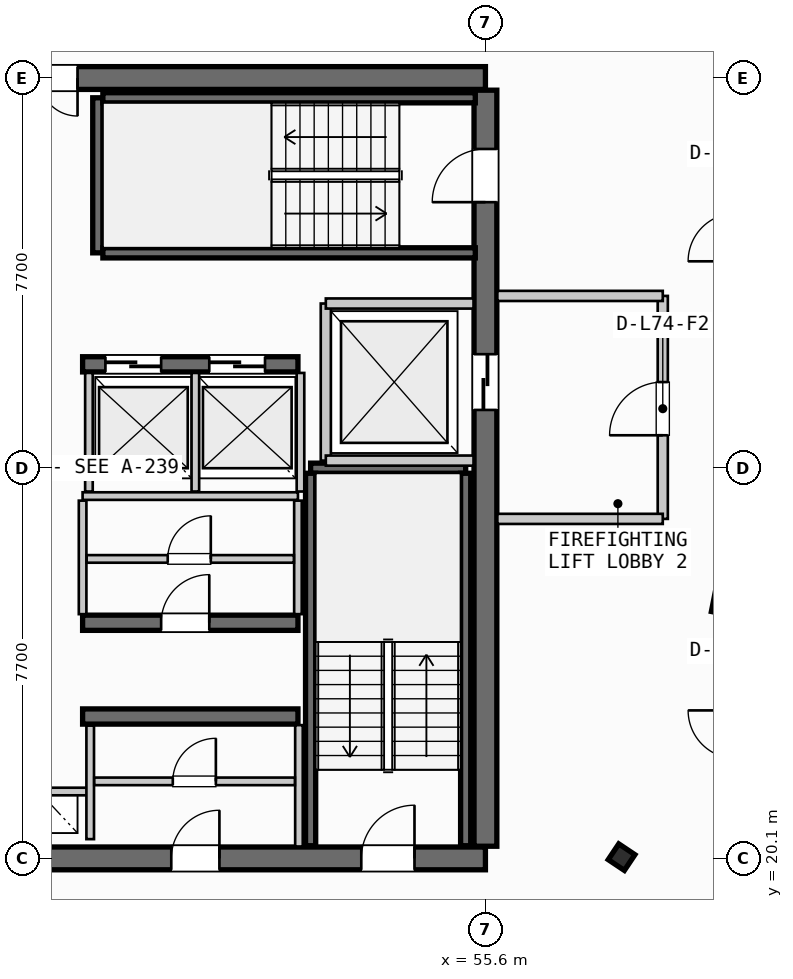
"""IFC4 building model, lengths in metres.
Left out: names, types, materials, properties, quantities, classifications, styles, units other than length and angle.
Written with IfcOpenShell. Run it as: python <this file> out.ifc"""

import sys

from ifc_helpers import new_model, si_unit, direction, frame, frame_2d, origin, origin_2d, place, context, subcontext, project, spatial, rectangle, i_section, extrude, source, transform, mapped, element, fill, save


model = new_model("IFC4")
c1 = context("Model", 3, precision=1e-05, world=origin(), true_north=direction((0.0, 1.0)))
c2 = subcontext(c1, "Body", "Model", "MODEL_VIEW")
j1 = project(units=[si_unit("LENGTHUNIT", "METRE"), si_unit("PLANEANGLEUNIT", "RADIAN")], contexts=[c1])
p1 = place(None, origin())
s1 = spatial("IfcSite", under=j1, at=p1, CompositionType="ELEMENT")
p2 = place(p1, origin())
s2 = spatial("IfcBuilding", under=s1, at=p2, CompositionType="ELEMENT")
p3 = place(p2, frame((0.0, 0.0, 280.15)))
s3 = spatial("IfcBuildingStorey", under=s2, at=p3, CompositionType="ELEMENT", Elevation=280.15)
p4 = place(p3, frame((38.0, 20.1, 0.0), z_axis=(0.0, 0.0, 1.0), x_axis=(1.0, 0.0, 0.0)))
e1 = element("IfcWall", 1, at=p4, inside=s3, PredefinedType="SHEAR", context=c2, shape_type="SweptSolid", body=[
    extrude(rectangle(XDim=17.6, YDim=0.45, at=frame_2d((8.8, 0.0))), origin(), (0.0, 0.0, 1.0), 3.21),
])
p5 = place(p4, frame((1.4, 0.0, 0.0)))
e2 = element("IfcOpeningElement", 2, at=p5, cuts=e1, PredefinedType="OPENING", context=c2, shape_type="SweptSolid", body=[
    extrude(rectangle(XDim=1.05, YDim=2.15, at=frame_2d((0.525, 1.075))), frame((0.0, 0.235, 0.0), z_axis=(0.0, -1.0, 0.0), x_axis=(1.0, 0.0, 0.0)), (0.0, 0.0, 1.0), 0.47),
])
p6 = place(p4, frame((15.15, 0.0, 0.0)))
e3 = element("IfcOpeningElement", 3, at=p6, cuts=e1, PredefinedType="OPENING", context=c2, shape_type="SweptSolid", body=[
    extrude(rectangle(XDim=1.05, YDim=2.15, at=frame_2d((0.525, 1.075))), frame((0.0, 0.235, 0.0), z_axis=(0.0, -1.0, 0.0), x_axis=(1.0, 0.0, 0.0)), (0.0, 0.0, 1.0), 0.47),
])
p7 = place(p4, frame((5.25, 0.0, 0.0)))
e4 = element("IfcOpeningElement", 4, at=p7, cuts=e1, PredefinedType="OPENING", context=c2, shape_type="SweptSolid", body=[
    extrude(rectangle(XDim=0.9, YDim=2.15, at=frame_2d((0.45, 1.075))), frame((0.0, 0.235, 0.0), z_axis=(0.0, -1.0, 0.0), x_axis=(1.0, 0.0, 0.0)), (0.0, 0.0, 1.0), 0.47),
])
p8 = place(p4, frame((11.4, 0.0, 0.0)))
e5 = element("IfcOpeningElement", 5, at=p8, cuts=e1, PredefinedType="OPENING", context=c2, shape_type="SweptSolid", body=[
    extrude(rectangle(XDim=0.95, YDim=2.15, at=frame_2d((0.475, 1.075))), frame((0.0, 0.235, 0.0), z_axis=(0.0, -1.0, 0.0), x_axis=(1.0, 0.0, 0.0)), (0.0, 0.0, 1.0), 0.47),
])
p9 = place(p3, frame((55.6, 35.5, 0.0), z_axis=(0.0, 0.0, 1.0), x_axis=(-1.0, 0.0, 0.0)))
e6 = element("IfcWall", 6, at=p9, inside=s3, PredefinedType="SHEAR", context=c2, shape_type="SweptSolid", body=[
    extrude(rectangle(XDim=17.6, YDim=0.45, at=frame_2d((8.8, 0.0))), origin(), (0.0, 0.0, 1.0), 3.21),
])
p10 = place(p9, frame((8.05, 0.0, 0.0)))
e7 = element("IfcOpeningElement", 7, at=p10, cuts=e6, PredefinedType="OPENING", context=c2, shape_type="SweptSolid", body=[
    extrude(rectangle(XDim=1.5, YDim=2.2, at=frame_2d((0.75, 1.1))), frame((0.0, 0.235, 0.0), z_axis=(0.0, -1.0, 0.0), x_axis=(1.0, 0.0, 0.0)), (0.0, 0.0, 1.0), 0.47),
])
p11 = place(p9, frame((15.1, 0.0, 0.0)))
e8 = element("IfcOpeningElement", 8, at=p11, cuts=e6, PredefinedType="OPENING", context=c2, shape_type="SweptSolid", body=[
    extrude(rectangle(XDim=0.95, YDim=2.15, at=frame_2d((0.475, 1.075))), frame((0.0, 0.235, 0.0), z_axis=(0.0, -1.0, 0.0), x_axis=(1.0, 0.0, 0.0)), (0.0, 0.0, 1.0), 0.47),
])
p12 = place(p9, frame((12.9, 0.0, 0.0)))
e9 = element("IfcOpeningElement", 9, at=p12, cuts=e6, PredefinedType="OPENING", context=c2, shape_type="SweptSolid", body=[
    extrude(rectangle(XDim=0.9, YDim=2.15, at=frame_2d((0.45, 1.075))), frame((0.0, 0.235, 0.0), z_axis=(0.0, -1.0, 0.0), x_axis=(1.0, 0.0, 0.0)), (0.0, 0.0, 1.0), 0.47),
])
p13 = place(p9, frame((10.6, 0.0, 0.0)))
e10 = element("IfcOpeningElement", 10, at=p13, cuts=e6, PredefinedType="OPENING", context=c2, shape_type="SweptSolid", body=[
    extrude(rectangle(XDim=0.95, YDim=2.15, at=frame_2d((0.475, 1.075))), frame((0.0, 0.235, 0.0), z_axis=(0.0, -1.0, 0.0), x_axis=(1.0, 0.0, 0.0)), (0.0, 0.0, 1.0), 0.47),
])
p14 = place(p3, frame((55.6, 20.34, 0.0), z_axis=(0.0, 0.0, 1.0), x_axis=(0.0, 1.0, 0.0)))
e11 = element("IfcWall", 11, at=p14, inside=s3, PredefinedType="SHEAR", context=c2, shape_type="SweptSolid", body=[
    extrude(rectangle(XDim=14.92, YDim=0.45, at=frame_2d((7.46, 0.0))), origin(), (0.0, 0.0, 1.0), 3.21),
])
p15 = place(p14, frame((12.71, 0.0, 0.0)))
e12 = element("IfcOpeningElement", 12, at=p15, cuts=e11, PredefinedType="OPENING", context=c2, shape_type="SweptSolid", body=[
    extrude(rectangle(XDim=1.05, YDim=2.15, at=frame_2d((0.525, 1.075))), frame((0.0, 0.235, 0.0), z_axis=(0.0, -1.0, 0.0), x_axis=(1.0, 0.0, 0.0)), (0.0, 0.0, 1.0), 0.47),
])
p16 = place(p14, frame((8.61, 0.0, 0.0)))
e13 = element("IfcOpeningElement", 13, at=p16, cuts=e11, PredefinedType="OPENING", context=c2, shape_type="SweptSolid", body=[
    extrude(rectangle(XDim=1.1, YDim=2.2, at=frame_2d((0.55, 1.1))), frame((0.0, 0.235, 0.0), z_axis=(0.0, -1.0, 0.0), x_axis=(1.0, 0.0, 0.0)), (0.0, 0.0, 1.0), 0.47),
])
p17 = place(p3, frame((47.65, 22.9, 0.0), z_axis=(0.0, 0.0, 1.0), x_axis=(1.0, 0.0, 0.0)))
e14 = element("IfcWall", 14, at=p17, inside=s3, PredefinedType="SHEAR", context=c2, shape_type="SweptSolid", body=[
    extrude(rectangle(XDim=4.25, YDim=0.3, at=frame_2d((2.125, 0.0))), origin(), (0.0, 0.0, 1.0), 3.21),
])
p18 = place(p3, frame((47.65, 24.75, 0.0), z_axis=(0.0, 0.0, 1.0), x_axis=(1.0, 0.0, 0.0)))
e15 = element("IfcWall", 15, at=p18, inside=s3, PredefinedType="SHEAR", context=c2, shape_type="SweptSolid", body=[
    extrude(rectangle(XDim=4.25, YDim=0.3, at=frame_2d((2.125, 0.0))), origin(), (0.0, 0.0, 1.0), 3.21),
])
p19 = place(p18, frame((1.55, 0.0, 0.0)))
e16 = element("IfcOpeningElement", 16, at=p19, cuts=e15, PredefinedType="OPENING", context=c2, shape_type="SweptSolid", body=[
    extrude(rectangle(XDim=0.95, YDim=2.15, at=frame_2d((0.475, 1.075))), frame((0.0, 0.16, 0.0), z_axis=(0.0, -1.0, 0.0), x_axis=(1.0, 0.0, 0.0)), (0.0, 0.0, 1.0), 0.32),
])
p20 = place(p3, frame((47.65, 29.85, 0.0), z_axis=(0.0, 0.0, 1.0), x_axis=(1.0, 0.0, 0.0)))
e17 = element("IfcWall", 17, at=p20, inside=s3, PredefinedType="SHEAR", context=c2, shape_type="SweptSolid", body=[
    extrude(rectangle(XDim=4.25, YDim=0.3, at=frame_2d((2.125, 0.0))), origin(), (0.0, 0.0, 1.0), 3.21),
])
p21 = place(p20, frame((0.45, 0.0, 0.0)))
e18 = element("IfcOpeningElement", 18, at=p21, cuts=e17, PredefinedType="OPENING", context=c2, shape_type="SweptSolid", body=[
    extrude(rectangle(XDim=1.1, YDim=2.2, at=frame_2d((0.55, 1.1))), frame((0.0, 0.16, 0.0), z_axis=(0.0, -1.0, 0.0), x_axis=(1.0, 0.0, 0.0)), (0.0, 0.0, 1.0), 0.32),
])
p22 = place(p20, frame((2.5, 0.0, 0.0)))
e19 = element("IfcOpeningElement", 19, at=p22, cuts=e17, PredefinedType="OPENING", context=c2, shape_type="SweptSolid", body=[
    extrude(rectangle(XDim=1.1, YDim=2.2, at=frame_2d((0.55, 1.1))), frame((0.0, 0.16, 0.0), z_axis=(0.0, -1.0, 0.0), x_axis=(1.0, 0.0, 0.0)), (0.0, 0.0, 1.0), 0.32),
])
m1 = source(origin(), c2, "Body", "SweptSolid", [
    extrude(i_section(OverallWidth=0.374, OverallDepth=0.383, WebThickness=0.017, FlangeThickness=0.026, FilletRadius=0.015, at=origin_2d()), origin(), (0.0, 0.0, 1.0), 3.21),
])
for number, where, z_axis, x_axis in (
    (20, (58.287, 20.125, 0.0), (0.0, 0.0, 1.0), (0.831, -0.556, 0.0)),
    (21, (60.284, 25.118, 0.0), (0.0, 0.0, 1.0), (0.981, -0.195, 0.0)),
):
    element("IfcColumn", number, at=place(p3, frame(where, z_axis=z_axis, x_axis=x_axis)), inside=s3, PredefinedType="COLUMN", context=c2, shape_type="MappedRepresentation", body=[
        mapped(m1, transform((0.0, 0.0, 0.0), scale=1.0)),
    ])
p23 = place(p3, frame((52.15, 27.8, 0.0), z_axis=(0.0, 0.0, 1.0), x_axis=(1.0, 0.0, 0.0)))
e22 = element("IfcWall", 22, at=p23, inside=s3, PredefinedType="SHEAR", context=c2, shape_type="SweptSolid", body=[
    extrude(rectangle(XDim=3.06, YDim=0.2, at=frame_2d((1.53, 0.0))), origin(), (0.0, 0.0, 1.0), 3.21),
])
for number, where, z_axis, x_axis in (
    (23, (55.21, 27.7, 0.0), (0.0, 0.0, 1.0), (0.0, -1.0, 0.0)),
    (24, (52.15, 20.35, 0.0), (0.0, 0.0, 1.0), (0.0, 1.0, 0.0)),
):
    element("IfcWall", number, at=place(p3, frame(where, z_axis=z_axis, x_axis=x_axis)), inside=s3, PredefinedType="SHEAR", context=c2, shape_type="SweptSolid", body=[
        extrude(rectangle(XDim=7.35, YDim=0.2, at=frame_2d((3.675, 0.0))), origin(), (0.0, 0.0, 1.0), 3.21),
    ])
p24 = place(p3, frame((47.95, 32.05, 0.0), z_axis=(0.0, 0.0, 1.0), x_axis=(0.0, 1.0, 0.0)))
e25 = element("IfcWall", 25, at=p24, inside=s3, PredefinedType="SHEAR", context=c2, shape_type="SweptSolid", body=[
    extrude(rectangle(XDim=3.06, YDim=0.2, at=frame_2d((1.53, 0.0))), origin(), (0.0, 0.0, 1.0), 3.21),
])
for number, where, z_axis, x_axis in (
    (26, (48.05, 35.11, 0.0), (0.0, 0.0, 1.0), (1.0, 0.0, 0.0)),
    (27, (55.4, 32.05, 0.0), (0.0, 0.0, 1.0), (-1.0, 0.0, 0.0)),
):
    element("IfcWall", number, at=place(p3, frame(where, z_axis=z_axis, x_axis=x_axis)), inside=s3, PredefinedType="SHEAR", context=c2, shape_type="SweptSolid", body=[
        extrude(rectangle(XDim=7.35, YDim=0.2, at=frame_2d((3.675, 0.0))), origin(), (0.0, 0.0, 1.0), 3.21),
    ])
p25 = place(p3, frame((45.8, 21.42, 0.0), z_axis=(0.0, 0.0, 1.0), x_axis=(1.0, 0.0, 0.0)))
e28 = element("IfcWall", 28, at=p25, inside=s3, PredefinedType="PARTITIONING", context=c2, shape_type="SweptSolid", body=[
    extrude(rectangle(XDim=2.0, YDim=0.15, at=frame_2d((1.0, 0.0))), origin(), (0.0, 0.0, 1.0), 2.455),
])
p26 = place(p3, frame((47.8, 20.48, 0.0), z_axis=(0.0, 0.0, 1.0), x_axis=(0.0, 1.0, 0.0)))
e29 = element("IfcWall", 29, at=p26, inside=s3, PredefinedType="PARTITIONING", context=c2, shape_type="SweptSolid", body=[
    extrude(rectangle(XDim=2.24, YDim=0.15, at=frame_2d((1.12, 0.0))), origin(), (0.0, 0.0, 1.0), 2.455),
])
p27 = place(p3, frame((52.45, 27.95, 0.0), z_axis=(0.0, 0.0, 1.0), x_axis=(0.0, 1.0, 0.0)))
e30 = element("IfcWall", 30, at=p27, inside=s3, PredefinedType="PARTITIONING", context=c2, shape_type="SweptSolid", body=[
    extrude(rectangle(XDim=3.1, YDim=0.2, at=frame_2d((1.55, 0.0))), origin(), (0.0, 0.0, 1.0), 2.455),
])
for number, where, z_axis, x_axis in (
    (31, (52.45, 27.95, 0.0), (0.0, 0.0, 1.0), (1.0, 0.0, 0.0)),
    (32, (52.45, 31.05, 0.0), (0.0, 0.0, 1.0), (1.0, 0.0, 0.0)),
):
    element("IfcWall", number, at=place(p3, frame(where, z_axis=z_axis, x_axis=x_axis)), inside=s3, PredefinedType="PARTITIONING", context=c2, shape_type="SweptSolid", body=[
        extrude(rectangle(XDim=2.915, YDim=0.2, at=frame_2d((1.458, 0.0))), origin(), (0.0, 0.0, 1.0), 2.455),
    ])
p28 = place(p3, frame((59.1, 26.8, 0.0), z_axis=(0.0, 0.0, 1.0), x_axis=(0.0, 1.0, 0.0)))
e33 = element("IfcWall", 33, at=p28, inside=s3, PredefinedType="PARTITIONING", context=c2, shape_type="SweptSolid", body=[
    extrude(rectangle(XDim=4.4, YDim=0.2, at=frame_2d((2.2, 0.0))), origin(), (0.0, 0.0, 1.0), 2.455),
])
p29 = place(p28, frame((1.65, 0.0, 0.0)))
e34 = element("IfcOpeningElement", 34, at=p29, cuts=e33, PredefinedType="OPENING", context=c2, shape_type="SweptSolid", body=[
    extrude(rectangle(XDim=1.05, YDim=2.15, at=frame_2d((0.525, 1.075))), frame((0.0, 0.11, 0.0), z_axis=(0.0, -1.0, 0.0), x_axis=(1.0, 0.0, 0.0)), (0.0, 0.0, 1.0), 0.22),
])
for number, where, z_axis, x_axis in (
    (35, (55.835, 26.8, 0.0), (0.0, 0.0, 1.0), (1.0, 0.0, 0.0)),
    (36, (55.835, 31.2, 0.0), (0.0, 0.0, 1.0), (1.0, 0.0, 0.0)),
):
    element("IfcWall", number, at=place(p3, frame(where, z_axis=z_axis, x_axis=x_axis)), inside=s3, PredefinedType="PARTITIONING", context=c2, shape_type="SweptSolid", body=[
        extrude(rectangle(XDim=3.265, YDim=0.2, at=frame_2d((1.633, 0.0))), origin(), (0.0, 0.0, 1.0), 2.455),
    ])
p30 = place(p3, frame((51.92, 20.335, 0.0), z_axis=(0.0, 0.0, 1.0), x_axis=(0.0, 1.0, 0.0)))
e37 = element("IfcWall", 37, at=p30, inside=s3, PredefinedType="PARTITIONING", context=c2, shape_type="SweptSolid", body=[
    extrude(rectangle(XDim=2.395, YDim=0.15, at=frame_2d((1.198, 0.0))), origin(), (0.0, 0.0, 1.0), 2.455),
])
p31 = place(p3, frame((47.88, 21.62, 0.0), z_axis=(0.0, 0.0, 1.0), x_axis=(1.0, 0.0, 0.0)))
e38 = element("IfcWall", 38, at=p31, inside=s3, PredefinedType="PARTITIONING", context=c2, shape_type="SweptSolid", body=[
    extrude(rectangle(XDim=3.96, YDim=0.15, at=frame_2d((1.98, 0.0))), origin(), (0.0, 0.0, 1.0), 2.455),
])
p32 = place(p31, frame((1.55, 0.0, 0.0)))
e39 = element("IfcOpeningElement", 39, at=p32, cuts=e38, PredefinedType="OPENING", context=c2, shape_type="SweptSolid", body=[
    extrude(rectangle(XDim=0.85, YDim=2.15, at=frame_2d((0.425, 1.075))), frame((0.0, 0.085, 0.0), z_axis=(0.0, -1.0, 0.0), x_axis=(1.0, 0.0, 0.0)), (0.0, 0.0, 1.0), 0.17),
])
p33 = place(p3, frame((47.65, 27.25, 0.0), z_axis=(0.0, 0.0, 1.0), x_axis=(1.0, 0.0, 0.0)))
e40 = element("IfcWall", 40, at=p33, inside=s3, PredefinedType="PARTITIONING", context=c2, shape_type="SweptSolid", body=[
    extrude(rectangle(XDim=4.25, YDim=0.15, at=frame_2d((2.125, 0.0))), origin(), (0.0, 0.0, 1.0), 2.455),
])
for number, where, z_axis, x_axis in (
    (41, (47.65, 24.92, 0.0), (0.0, 0.0, 1.0), (0.0, 1.0, 0.0)),
    (42, (51.9, 24.92, 0.0), (0.0, 0.0, 1.0), (0.0, 1.0, 0.0)),
):
    element("IfcWall", number, at=place(p3, frame(where, z_axis=z_axis, x_axis=x_axis)), inside=s3, PredefinedType="PARTITIONING", context=c2, shape_type="SweptSolid", body=[
        extrude(rectangle(XDim=2.24, YDim=0.15, at=frame_2d((1.12, 0.0))), origin(), (0.0, 0.0, 1.0), 2.455),
    ])
p34 = place(p3, frame((47.73, 26.01, 0.0), z_axis=(0.0, 0.0, 1.0), x_axis=(1.0, 0.0, 0.0)))
e43 = element("IfcWall", 43, at=p34, inside=s3, PredefinedType="PARTITIONING", context=c2, shape_type="SweptSolid", body=[
    extrude(rectangle(XDim=4.09, YDim=0.15, at=frame_2d((2.045, 0.0))), origin(), (0.0, 0.0, 1.0), 2.455),
])
p35 = place(p34, frame((1.6, 0.0, 0.0)))
e44 = element("IfcOpeningElement", 44, at=p35, cuts=e43, PredefinedType="OPENING", context=c2, shape_type="SweptSolid", body=[
    extrude(rectangle(XDim=0.85, YDim=2.15, at=frame_2d((0.425, 1.075))), frame((0.0, 0.085, 0.0), z_axis=(0.0, -1.0, 0.0), x_axis=(1.0, 0.0, 0.0)), (0.0, 0.0, 1.0), 0.17),
])
for number, where, z_axis, x_axis in (
    (45, (47.775, 27.34, 0.0), (0.0, 0.0, 1.0), (0.0, 1.0, 0.0)),
    (46, (49.875, 27.34, 0.0), (0.0, 0.0, 1.0), (0.0, 1.0, 0.0)),
    (47, (51.95, 27.34, 0.0), (0.0, 0.0, 1.0), (0.0, 1.0, 0.0)),
):
    element("IfcWall", number, at=place(p3, frame(where, z_axis=z_axis, x_axis=x_axis)), inside=s3, PredefinedType="PARTITIONING", context=c2, shape_type="SweptSolid", body=[
        extrude(rectangle(XDim=2.34, YDim=0.15, at=frame_2d((1.17, 0.0))), origin(), (0.0, 0.0, 1.0), 2.455),
    ])
m2 = source(origin(), c2, "Body", "SweptSolid", [
    extrude(rectangle(XDim=1.05, YDim=2.15, at=frame_2d((0.525, 1.075))), frame((0.0, 0.025, 0.0), z_axis=(0.0, -1.0, 0.0), x_axis=(1.0, 0.0, 0.0)), (0.0, 0.0, 1.0), 0.05),
])
p36 = place(p6, origin())
e48 = element("IfcDoor", 48, at=p36, inside=s3, OperationType="SINGLE_SWING_RIGHT", PredefinedType="DOOR", context=c2, shape_type="MappedRepresentation", body=[
    mapped(m2, transform((0.0, 0.0, 0.0), scale=1.0)),
])
fill(e3, e48)
p37 = place(p15, origin())
e49 = element("IfcDoor", 49, at=p37, inside=s3, OperationType="SINGLE_SWING_LEFT", PredefinedType="DOOR", context=c2, shape_type="MappedRepresentation", body=[
    mapped(m2, transform((0.0, 0.0, 0.0), scale=1.0)),
])
fill(e12, e49)
m3 = source(origin(), c2, "Body", "SweptSolid", [
    extrude(rectangle(XDim=1.5, YDim=2.2, at=frame_2d((0.75, 1.1))), frame((0.0, 0.025, 0.0), z_axis=(0.0, -1.0, 0.0), x_axis=(1.0, 0.0, 0.0)), (0.0, 0.0, 1.0), 0.05),
])
p38 = place(p10, origin())
e50 = element("IfcDoor", 50, at=p38, inside=s3, OperationType="DOUBLE_DOOR_SINGLE_SWING", PredefinedType="DOOR", context=c2, shape_type="MappedRepresentation", body=[
    mapped(m3, transform((0.0, 0.0, 0.0), scale=1.0)),
])
fill(e7, e50)
m4 = source(origin(), c2, "Body", "SweptSolid", [
    extrude(rectangle(XDim=1.1, YDim=2.2, at=frame_2d((0.55, 1.1))), frame((0.0, 0.025, 0.0), z_axis=(0.0, -1.0, 0.0), x_axis=(1.0, 0.0, 0.0)), (0.0, 0.0, 1.0), 0.05),
])
p39 = place(p16, origin())
e51 = element("IfcDoor", 51, at=p39, inside=s3, OperationType="SLIDING_TO_RIGHT", PredefinedType="DOOR", context=c2, shape_type="MappedRepresentation", body=[
    mapped(m4, transform((0.0, 0.0, 0.0), scale=1.0)),
])
fill(e13, e51)
m5 = source(origin(), c2, "Body", "SweptSolid", [
    extrude(rectangle(XDim=0.95, YDim=2.15, at=frame_2d((0.475, 1.075))), frame((0.0, 0.025, 0.0), z_axis=(0.0, -1.0, 0.0), x_axis=(1.0, 0.0, 0.0)), (0.0, 0.0, 1.0), 0.05),
])
p40 = place(p8, origin())
e52 = element("IfcDoor", 52, at=p40, inside=s3, OperationType="SINGLE_SWING_RIGHT", PredefinedType="DOOR", context=c2, shape_type="MappedRepresentation", body=[
    mapped(m5, transform((0.0, 0.0, 0.0), scale=1.0)),
])
fill(e5, e52)
p41 = place(p19, origin())
e53 = element("IfcDoor", 53, at=p41, inside=s3, OperationType="SINGLE_SWING_RIGHT", PredefinedType="DOOR", context=c2, shape_type="MappedRepresentation", body=[
    mapped(m5, transform((0.0, 0.0, 0.0), scale=1.0)),
])
fill(e16, e53)
p42 = place(p21, origin())
e54 = element("IfcDoor", 54, at=p42, inside=s3, OperationType="SLIDING_TO_LEFT", PredefinedType="DOOR", context=c2, shape_type="MappedRepresentation", body=[
    mapped(m4, transform((0.0, 0.0, 0.0), scale=1.0)),
])
fill(e18, e54)
p43 = place(p22, origin())
e55 = element("IfcDoor", 55, at=p43, inside=s3, OperationType="SLIDING_TO_LEFT", PredefinedType="DOOR", context=c2, shape_type="MappedRepresentation", body=[
    mapped(m4, transform((0.0, 0.0, 0.0), scale=1.0)),
])
fill(e19, e55)
p44 = place(p29, origin())
e56 = element("IfcDoor", 56, at=p44, inside=s3, OperationType="SINGLE_SWING_LEFT", PredefinedType="DOOR", context=c2, shape_type="MappedRepresentation", body=[
    mapped(m2, transform((0.0, 0.0, 0.0), scale=1.0)),
])
fill(e34, e56)
m6 = source(origin(), c2, "Body", "SweptSolid", [
    extrude(rectangle(XDim=0.85, YDim=2.15, at=frame_2d((0.425, 1.075))), frame((0.0, 0.025, 0.0), z_axis=(0.0, -1.0, 0.0), x_axis=(1.0, 0.0, 0.0)), (0.0, 0.0, 1.0), 0.05),
])
p45 = place(p32, origin())
e57 = element("IfcDoor", 57, at=p45, inside=s3, OperationType="SINGLE_SWING_RIGHT", PredefinedType="DOOR", context=c2, shape_type="MappedRepresentation", body=[
    mapped(m6, transform((0.0, 0.0, 0.0), scale=1.0)),
])
fill(e39, e57)
p46 = place(p35, origin())
e58 = element("IfcDoor", 58, at=p46, inside=s3, OperationType="SINGLE_SWING_RIGHT", PredefinedType="DOOR", context=c2, shape_type="MappedRepresentation", body=[
    mapped(m6, transform((0.0, 0.0, 0.0), scale=1.0)),
])
fill(e44, e58)
save(model, sys.argv[1])
